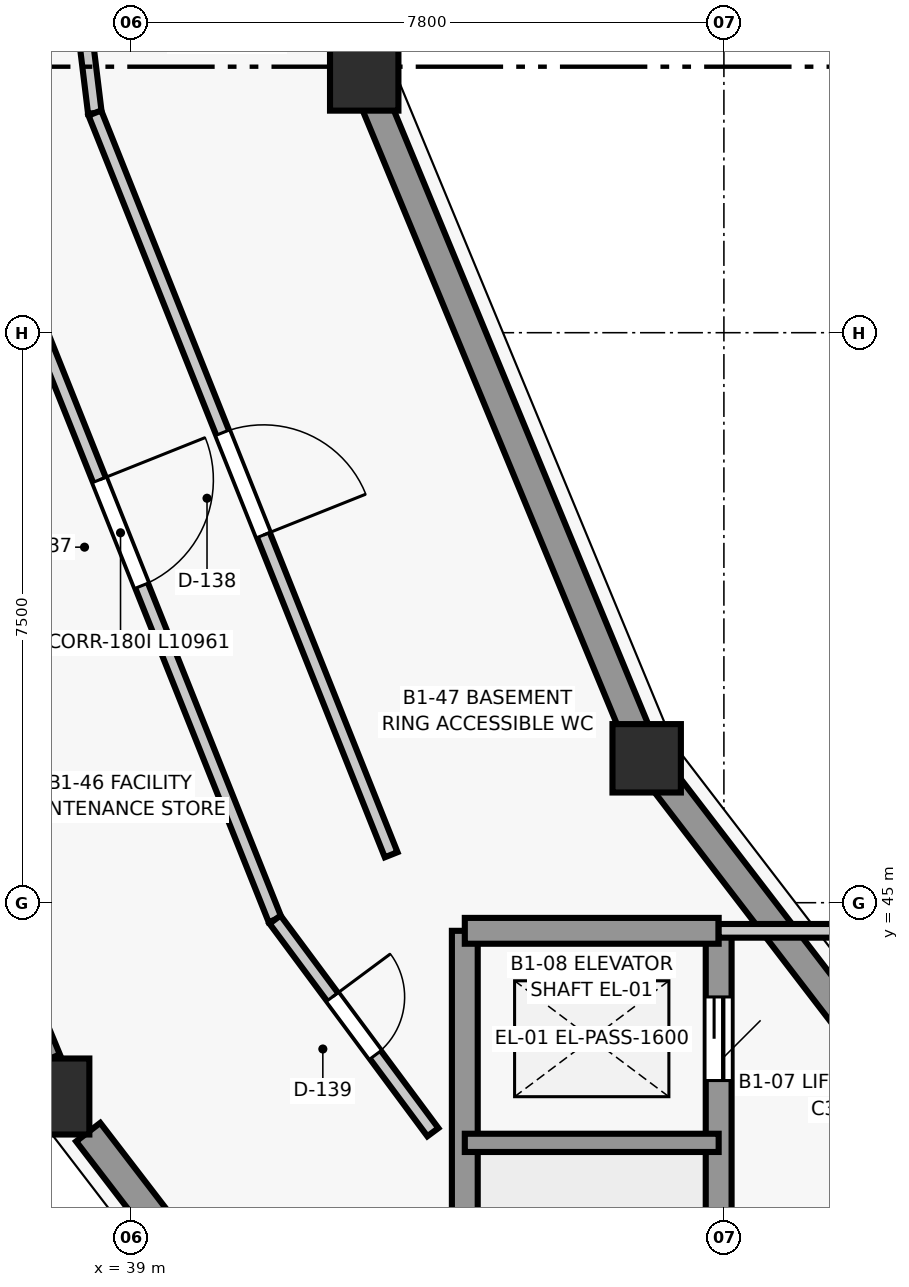
"""IFC4 building model, lengths in metres.
Left out: names, types, materials, properties, quantities, classifications, styles, units other than length and angle.
Written with IfcOpenShell. Run it as: python <this file> out.ifc"""

import sys

from ifc_helpers import new_model, si_unit, direction, frame, frame_2d, origin, origin_2d, place, context, subcontext, project, spatial, rectangle, circle, extrude, element, fill, save


model = new_model("IFC4")
c1 = context("Model", 3, precision=1e-05, world=origin(), true_north=direction((0.0, 1.0)))
c2 = subcontext(c1, "Body", "Model", "MODEL_VIEW")
j1 = project(units=[si_unit("LENGTHUNIT", "METRE"), si_unit("PLANEANGLEUNIT", "RADIAN")], contexts=[c1])
p1 = place(None, origin())
s1 = spatial("IfcSite", under=j1, at=p1, CompositionType="ELEMENT")
p2 = place(p1, origin())
s2 = spatial("IfcBuilding", under=s1, at=p2, CompositionType="ELEMENT")
p3 = place(p2, frame((0.0, 0.0, -4.2)))
s3 = spatial("IfcBuildingStorey", under=s2, at=p3, CompositionType="ELEMENT", Elevation=-4.2)
for number, where, z_axis, x_axis in (
    (1, (42.068, 55.872, 0.0), (0.0, 0.0, 1.0), (1.0, 0.0, 0.0)),
    (2, (45.784, 46.9, 0.0), (0.0, 0.0, 1.0), (1.0, 0.0, 0.0)),
):
    element("IfcColumn", number, at=place(p3, frame(where, z_axis=z_axis, x_axis=x_axis)), inside=s3, PredefinedType="COLUMN", context=c2, shape_type="SweptSolid", body=[
        extrude(circle(Radius=0.45, at=origin_2d()), origin(), (0.0, 0.0, 1.0), 4.2),
    ])
p4 = place(p3, frame((38.076, 42.45, 0.0), z_axis=(0.0, 0.0, 1.0), x_axis=(1.0, 0.0, 0.0)))
e3 = element("IfcColumn", 3, at=p4, inside=s3, PredefinedType="COLUMN", context=c2, shape_type="SweptSolid", body=[
    extrude(rectangle(XDim=0.75, YDim=1.0, at=origin_2d()), origin(), (0.0, 0.0, 1.0), 4.2),
])
p5 = place(p3, frame((40.836, 65.225, 0.0), z_axis=(0.0, 0.0, 1.0), x_axis=(0.130549698469, -0.991441766434, 0.0)))
e4 = element("IfcWall", 4, at=p5, inside=s3, PredefinedType="SHEAR", context=c2, shape_type="SweptSolid", body=[
    extrude(rectangle(XDim=9.156, YDim=0.38, at=frame_2d((4.578, 0.0))), origin(), (0.0, 0.0, 1.0), 3.92),
])
p6 = place(p3, frame((37.879, 42.927, 0.0), z_axis=(0.0, 0.0, 1.0), x_axis=(-0.382695413149, 0.923874569817, 0.0)))
e5 = element("IfcWall", 5, at=p6, inside=s3, PredefinedType="SHEAR", context=c2, shape_type="SweptSolid", body=[
    extrude(rectangle(XDim=11.002, YDim=0.4, at=frame_2d((5.501, 0.0))), origin(), (0.0, 0.0, 1.0), 3.92),
])
p7 = place(p3, frame((42.182, 55.595, 0.0), z_axis=(0.0, 0.0, 1.0), x_axis=(0.382681519675, -0.923880324771, 0.0)))
e6 = element("IfcWall", 6, at=p7, inside=s3, PredefinedType="SHEAR", context=c2, shape_type="SweptSolid", body=[
    extrude(rectangle(XDim=9.112, YDim=0.38, at=frame_2d((4.556, 0.0))), origin(), (0.0, 0.0, 1.0), 3.92),
])
p8 = place(p3, frame((45.042, 33.371, 0.0), z_axis=(0.0, 0.0, 1.0), x_axis=(-0.608753590889, 0.79335935463, 0.0)))
e7 = element("IfcWall", 7, at=p8, inside=s3, PredefinedType="SHEAR", context=c2, shape_type="SweptSolid", body=[
    extrude(rectangle(XDim=10.852, YDim=0.4, at=frame_2d((5.426, 0.0))), origin(), (0.0, 0.0, 1.0), 3.92),
])
p9 = place(p3, frame((45.999, 46.62, 0.0), z_axis=(0.0, 0.0, 1.0), x_axis=(0.608769580289, -0.793347085527, 0.0)))
e8 = element("IfcWall", 8, at=p9, inside=s3, PredefinedType="SHEAR", context=c2, shape_type="SweptSolid", body=[
    extrude(rectangle(XDim=9.005, YDim=0.38, at=frame_2d((4.502, 0.0))), origin(), (0.0, 0.0, 1.0), 3.92),
])
p10 = place(p3, frame((46.731, 44.63, 0.0), z_axis=(0.0, 0.0, 1.0), x_axis=(0.0, -1.0, 0.0)))
e9 = element("IfcWall", 9, at=p10, inside=s3, PredefinedType="SHEAR", context=c2, shape_type="SweptSolid", body=[
    extrude(rectangle(XDim=9.73, YDim=0.34, at=frame_2d((4.865, 0.0))), origin(), (0.0, 0.0, 1.0), 4.2),
])
p11 = place(p10, frame((8.265, 0.0, 0.0)))
e10 = element("IfcOpeningElement", 10, at=p11, cuts=e9, PredefinedType="OPENING", context=c2, shape_type="SweptSolid", body=[
    extrude(rectangle(XDim=1.15, YDim=2.15, at=frame_2d((0.575, 1.075))), frame((0.0, 0.18, 0.0), z_axis=(0.0, -1.0, 0.0), x_axis=(1.0, 0.0, 0.0)), (0.0, 0.0, 1.0), 0.36),
])
p12 = place(p10, frame((0.87, 0.0, 0.0)))
e11 = element("IfcOpeningElement", 11, at=p12, cuts=e9, PredefinedType="OPENING", context=c2, shape_type="SweptSolid", body=[
    extrude(rectangle(XDim=1.1, YDim=2.15, at=frame_2d((0.55, 1.075))), frame((0.0, 0.18, 0.0), z_axis=(0.0, -1.0, 0.0), x_axis=(1.0, 0.0, 0.0)), (0.0, 0.0, 1.0), 0.36),
])
p13 = place(p3, frame((43.391, 34.9, 0.0), z_axis=(0.0, 0.0, 1.0), x_axis=(0.0, 1.0, 0.0)))
e12 = element("IfcWall", 12, at=p13, inside=s3, PredefinedType="SHEAR", context=c2, shape_type="SweptSolid", body=[
    extrude(rectangle(XDim=9.73, YDim=0.34, at=frame_2d((4.865, 0.0))), origin(), (0.0, 0.0, 1.0), 4.2),
])
p14 = place(p3, frame((43.391, 44.63, 0.0), z_axis=(0.0, 0.0, 1.0), x_axis=(1.0, 0.0, 0.0)))
e13 = element("IfcWall", 13, at=p14, inside=s3, PredefinedType="SHEAR", context=c2, shape_type="SweptSolid", body=[
    extrude(rectangle(XDim=3.34, YDim=0.34, at=frame_2d((1.67, 0.0))), origin(), (0.0, 0.0, 1.0), 4.2),
])
p15 = place(p3, frame((46.731, 41.84, 0.0), z_axis=(0.0, 0.0, 1.0), x_axis=(-1.0, 0.0, 0.0)))
e14 = element("IfcWall", 14, at=p15, inside=s3, PredefinedType="SHEAR", context=c2, shape_type="SweptSolid", body=[
    extrude(rectangle(XDim=3.34, YDim=0.24, at=frame_2d((1.67, 0.0))), origin(), (0.0, 0.0, 1.0), 4.2),
])
p16 = place(p3, frame((46.731, 44.63, 0.0), z_axis=(0.0, 0.0, 1.0), x_axis=(1.0, 0.0, 0.0)))
e15 = element("IfcWall", 15, at=p16, inside=s3, PredefinedType="PARTITIONING", context=c2, shape_type="SweptSolid", body=[
    extrude(rectangle(XDim=2.25, YDim=0.18, at=frame_2d((1.125, 0.0))), origin(), (0.0, 0.0, 1.0), 3.915),
])
p17 = place(p3, frame((37.763, 61.625, 0.0), z_axis=(0.0, 0.0, 1.0), x_axis=(0.12105344106, -0.992645991483, 0.0)))
e16 = element("IfcWall", 16, at=p17, inside=s3, PredefinedType="PARTITIONING", context=c2, shape_type="SweptSolid", body=[
    extrude(rectangle(XDim=6.28, YDim=0.18, at=frame_2d((3.14, 0.0))), origin(), (0.0, 0.0, 1.0), 3.915),
])
p18 = place(p17, frame((2.54, 0.0, 0.0)))
e17 = element("IfcOpeningElement", 17, at=p18, cuts=e16, PredefinedType="OPENING", context=c2, shape_type="SweptSolid", body=[
    extrude(rectangle(XDim=1.2, YDim=2.15, at=frame_2d((0.6, 1.075))), frame((0.0, 0.1, 0.0), z_axis=(0.0, -1.0, 0.0), x_axis=(1.0, 0.0, 0.0)), (0.0, 0.0, 1.0), 0.2),
])
p19 = place(p3, frame((36.829, 54.957, 0.0), z_axis=(0.0, 0.0, 1.0), x_axis=(0.370918279433, -0.928665510279, 0.0)))
e18 = element("IfcWall", 18, at=p19, inside=s3, PredefinedType="PARTITIONING", context=c2, shape_type="SweptSolid", body=[
    extrude(rectangle(XDim=10.961, YDim=0.18, at=frame_2d((5.48, 0.0))), origin(), (0.0, 0.0, 1.0), 3.915),
])
p20 = place(p19, frame((4.73, 0.0, 0.0)))
e19 = element("IfcOpeningElement", 19, at=p20, cuts=e18, PredefinedType="OPENING", context=c2, shape_type="SweptSolid", body=[
    extrude(rectangle(XDim=1.5, YDim=2.15, at=frame_2d((0.75, 1.075))), frame((0.0, 0.1, 0.0), z_axis=(0.0, -1.0, 0.0), x_axis=(1.0, 0.0, 0.0)), (0.0, 0.0, 1.0), 0.2),
])
p21 = place(p3, frame((38.524, 55.391, 0.0), z_axis=(0.0, 0.0, 1.0), x_axis=(0.370942047159, -0.92865601686, 0.0)))
e20 = element("IfcWall", 20, at=p21, inside=s3, PredefinedType="PARTITIONING", context=c2, shape_type="SweptSolid", body=[
    extrude(rectangle(XDim=10.51, YDim=0.18, at=frame_2d((5.255, 0.0))), origin(), (0.0, 0.0, 1.0), 3.915),
])
p22 = place(p21, frame((4.53, 0.0, 0.0)))
e21 = element("IfcOpeningElement", 21, at=p22, cuts=e20, PredefinedType="OPENING", context=c2, shape_type="SweptSolid", body=[
    extrude(rectangle(XDim=1.45, YDim=2.2, at=frame_2d((0.725, 1.1))), frame((0.0, 0.1, 0.0), z_axis=(0.0, -1.0, 0.0), x_axis=(1.0, 0.0, 0.0)), (0.0, 0.0, 1.0), 0.2),
])
p23 = place(p3, frame((40.894, 44.778, 0.0), z_axis=(0.0, 0.0, 1.0), x_axis=(0.59610205182, -0.802908677134, 0.0)))
e22 = element("IfcWall", 22, at=p23, inside=s3, PredefinedType="PARTITIONING", context=c2, shape_type="SweptSolid", body=[
    extrude(rectangle(XDim=3.484, YDim=0.18, at=frame_2d((1.742, 0.0))), origin(), (0.0, 0.0, 1.0), 3.915),
])
p24 = place(p23, frame((1.267, 0.0, 0.0)))
e23 = element("IfcOpeningElement", 23, at=p24, cuts=e22, PredefinedType="OPENING", context=c2, shape_type="SweptSolid", body=[
    extrude(rectangle(XDim=0.95, YDim=2.1, at=frame_2d((0.475, 1.05))), frame((0.0, 0.1, 0.0), z_axis=(0.0, -1.0, 0.0), x_axis=(1.0, 0.0, 0.0)), (0.0, 0.0, 1.0), 0.2),
])
p25 = place(p12, origin())
e24 = element("IfcDoor", 24, at=p25, inside=s3, OperationType="SLIDING_TO_LEFT", PredefinedType="DOOR", context=c2, shape_type="SweptSolid", body=[
    extrude(rectangle(XDim=1.1, YDim=2.15, at=frame_2d((0.55, 1.075))), frame((0.0, 0.025, 0.0), z_axis=(0.0, -1.0, 0.0), x_axis=(1.0, 0.0, 0.0)), (0.0, 0.0, 1.0), 0.05),
])
fill(e11, e24)
p26 = place(p20, origin())
e25 = element("IfcDoor", 25, at=p26, inside=s3, OperationType="SINGLE_SWING_LEFT", PredefinedType="DOOR", context=c2, shape_type="SweptSolid", body=[
    extrude(rectangle(XDim=1.5, YDim=2.15, at=frame_2d((0.75, 1.075))), frame((0.0, 0.025, 0.0), z_axis=(0.0, -1.0, 0.0), x_axis=(1.0, 0.0, 0.0)), (0.0, 0.0, 1.0), 0.05),
])
fill(e19, e25)
p27 = place(p22, origin())
e26 = element("IfcDoor", 26, at=p27, inside=s3, OperationType="SINGLE_SWING_RIGHT", PredefinedType="DOOR", context=c2, shape_type="SweptSolid", body=[
    extrude(rectangle(XDim=1.45, YDim=2.2, at=frame_2d((0.725, 1.1))), frame((0.0, 0.025, 0.0), z_axis=(0.0, -1.0, 0.0), x_axis=(1.0, 0.0, 0.0)), (0.0, 0.0, 1.0), 0.05),
])
fill(e21, e26)
p28 = place(p24, origin())
e27 = element("IfcDoor", 27, at=p28, inside=s3, OperationType="SINGLE_SWING_LEFT", PredefinedType="DOOR", context=c2, shape_type="SweptSolid", body=[
    extrude(rectangle(XDim=0.95, YDim=2.1, at=frame_2d((0.475, 1.05))), frame((0.0, 0.025, 0.0), z_axis=(0.0, -1.0, 0.0), x_axis=(1.0, 0.0, 0.0)), (0.0, 0.0, 1.0), 0.05),
])
fill(e23, e27)
save(model, sys.argv[1])
